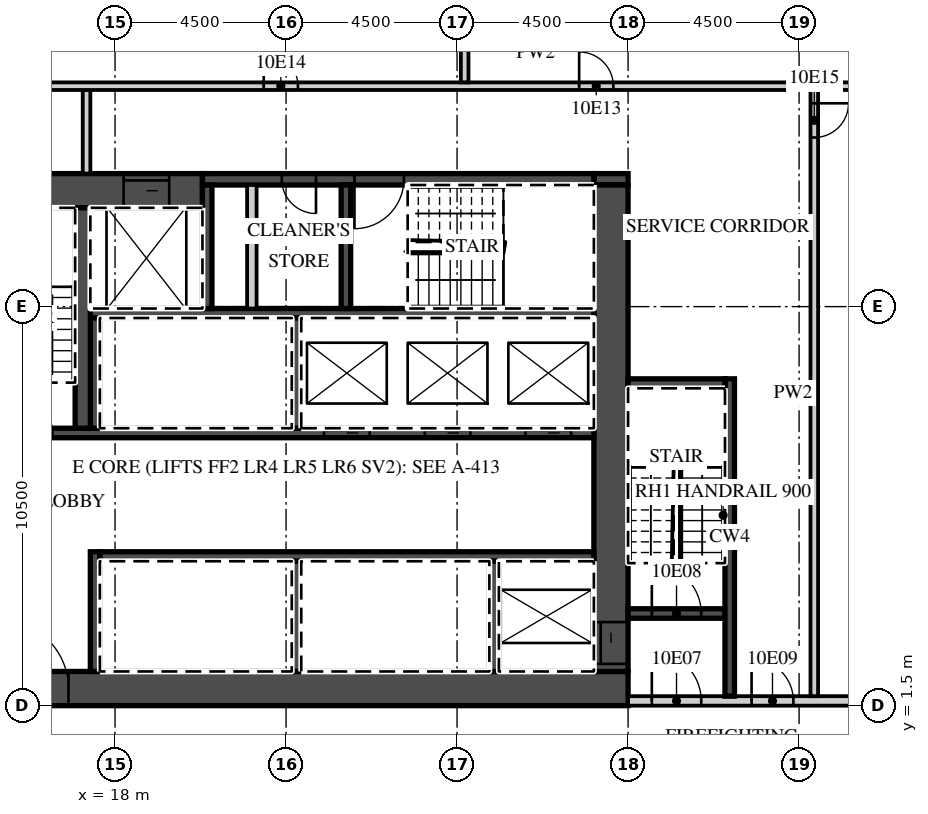
"""IFC4 building model, lengths in metres.
Left out: names, types, materials, properties, quantities, classifications, styles, units other than length and angle.
Written with IfcOpenShell. Run it as: python <this file> out.ifc"""

import sys

from ifc_helpers import new_model, si_unit, direction, frame, frame_2d, origin, place, context, subcontext, project, spatial, rectangle, extrude, element, fill, save


model = new_model("IFC4")
c1 = context("Model", 3, precision=1e-05, world=origin(), true_north=direction((0.0, 1.0)))
c2 = subcontext(c1, "Body", "Model", "MODEL_VIEW")
j1 = project(units=[si_unit("LENGTHUNIT", "METRE"), si_unit("PLANEANGLEUNIT", "RADIAN")], contexts=[c1])
p1 = place(None, origin())
s1 = spatial("IfcSite", under=j1, at=p1, CompositionType="ELEMENT")
p2 = place(p1, origin())
s2 = spatial("IfcBuilding", under=s1, at=p2, CompositionType="ELEMENT")
p3 = place(p2, frame((0.0, 0.0, 63.3)))
s3 = spatial("IfcBuildingStorey", under=s2, at=p3, CompositionType="ELEMENT", Elevation=63.3)
p4 = place(p3, frame((13.5, 1.95, 0.0), z_axis=(0.0, 0.0, 1.0), x_axis=(1.0, 0.0, 0.0)))
e1 = element("IfcWall", 1, at=p4, inside=s3, PredefinedType="SHEAR", context=c2, shape_type="SweptSolid", body=[
    extrude(rectangle(XDim=18.0, YDim=0.9, at=frame_2d((9.0, 0.0))), origin(), (0.0, 0.0, 1.0), 3.02),
])
p5 = place(p4, frame((1.475, 0.0, 0.0)))
e2 = element("IfcOpeningElement", 2, at=p5, cuts=e1, PredefinedType="OPENING", context=c2, shape_type="SweptSolid", body=[
    extrude(rectangle(XDim=1.8, YDim=2.1, at=frame_2d((0.9, 1.05))), frame((0.0, 0.46, 0.0), z_axis=(0.0, -1.0, 0.0), x_axis=(1.0, 0.0, 0.0)), (0.0, 0.0, 1.0), 0.92),
])
p6 = place(p3, frame((13.5, 15.05, 0.0), z_axis=(0.0, 0.0, 1.0), x_axis=(1.0, 0.0, 0.0)))
e3 = element("IfcWall", 3, at=p6, inside=s3, PredefinedType="SHEAR", context=c2, shape_type="SweptSolid", body=[
    extrude(rectangle(XDim=6.8, YDim=0.9, at=frame_2d((3.4, 0.0))), origin(), (0.0, 0.0, 1.0), 3.02),
])
p7 = place(p6, frame((4.725, 0.0, 0.0)))
e4 = element("IfcOpeningElement", 4, at=p7, cuts=e3, PredefinedType="OPENING", context=c2, shape_type="SweptSolid", body=[
    extrude(rectangle(XDim=1.2, YDim=2.1, at=frame_2d((0.6, 1.05))), frame((0.0, 0.46, 0.0), z_axis=(0.0, -1.0, 0.0), x_axis=(1.0, 0.0, 0.0)), (0.0, 0.0, 1.0), 0.92),
])
p8 = place(p3, frame((30.6, 15.35, 0.0), z_axis=(0.0, 0.0, 1.0), x_axis=(1.0, 0.0, 0.0)))
e5 = element("IfcWall", 5, at=p8, inside=s3, PredefinedType="SHEAR", context=c2, shape_type="SweptSolid", body=[
    extrude(rectangle(XDim=0.9, YDim=0.3, at=frame_2d((0.45, 0.0))), origin(), (0.0, 0.0, 1.0), 3.02),
])
p9 = place(p3, frame((20.3, 15.35, 0.0), z_axis=(0.0, 0.0, 1.0), x_axis=(1.0, 0.0, 0.0)))
e6 = element("IfcWall", 6, at=p9, inside=s3, PredefinedType="SHEAR", context=c2, shape_type="SweptSolid", body=[
    extrude(rectangle(XDim=10.3, YDim=0.3, at=frame_2d((5.15, 0.0))), origin(), (0.0, 0.0, 1.0), 3.02),
])
p10 = place(p9, frame((4.0, 0.0, 0.0)))
e7 = element("IfcOpeningElement", 7, at=p10, cuts=e6, PredefinedType="OPENING", context=c2, shape_type="SweptSolid", body=[
    extrude(rectangle(XDim=1.3, YDim=2.1, at=frame_2d((0.65, 1.05))), frame((0.0, 0.16, 0.0), z_axis=(0.0, -1.0, 0.0), x_axis=(1.0, 0.0, 0.0)), (0.0, 0.0, 1.0), 0.32),
])
p11 = place(p9, frame((2.087, 0.0, 0.0)))
e8 = element("IfcOpeningElement", 8, at=p11, cuts=e6, PredefinedType="OPENING", context=c2, shape_type="SweptSolid", body=[
    extrude(rectangle(XDim=0.9, YDim=2.1, at=frame_2d((0.45, 1.05))), frame((0.0, 0.16, 0.0), z_axis=(0.0, -1.0, 0.0), x_axis=(1.0, 0.0, 0.0)), (0.0, 0.0, 1.0), 0.32),
])
p12 = place(p3, frame((31.05, 2.4, 0.0), z_axis=(0.0, 0.0, 1.0), x_axis=(0.0, 1.0, 0.0)))
e9 = element("IfcWall", 9, at=p12, inside=s3, PredefinedType="SHEAR", context=c2, shape_type="SweptSolid", body=[
    extrude(rectangle(XDim=12.8, YDim=0.9, at=frame_2d((6.4, 0.0))), origin(), (0.0, 0.0, 1.0), 3.02),
])
p13 = place(p12, frame((0.2, 0.0, 0.0)))
e10 = element("IfcOpeningElement", 10, at=p13, cuts=e9, PredefinedType="OPENING", context=c2, shape_type="SweptSolid", body=[
    extrude(rectangle(XDim=1.1, YDim=2.1, at=frame_2d((0.55, 1.05))), frame((0.0, 0.46, 0.0), z_axis=(0.0, -1.0, 0.0), x_axis=(1.0, 0.0, 0.0)), (0.0, 0.0, 1.0), 0.92),
])
p14 = place(p3, frame((17.6, 5.425, 0.0), z_axis=(0.0, 0.0, 1.0), x_axis=(1.0, 0.0, 0.0)))
e11 = element("IfcWall", 11, at=p14, inside=s3, PredefinedType="SHEAR", context=c2, shape_type="SweptSolid", body=[
    extrude(rectangle(XDim=13.0, YDim=0.25, at=frame_2d((6.5, 0.0))), origin(), (0.0, 0.0, 1.0), 3.02),
])
p15 = place(p3, frame((17.475, 2.4, 0.0), z_axis=(0.0, 0.0, 1.0), x_axis=(0.0, 1.0, 0.0)))
e12 = element("IfcWall", 12, at=p15, inside=s3, PredefinedType="SHEAR", context=c2, shape_type="SweptSolid", body=[
    extrude(rectangle(XDim=3.15, YDim=0.25, at=frame_2d((1.575, 0.0))), origin(), (0.0, 0.0, 1.0), 3.02),
])
for number, where, z_axis, x_axis in (
    (13, (27.975, 2.4, 0.0), (0.0, 0.0, 1.0), (0.0, 1.0, 0.0)),
    (14, (22.775, 2.4, 0.0), (0.0, 0.0, 1.0), (0.0, 1.0, 0.0)),
):
    element("IfcWall", number, at=place(p3, frame(where, z_axis=z_axis, x_axis=x_axis)), inside=s3, PredefinedType="SHEAR", context=c2, shape_type="SweptSolid", body=[
        extrude(rectangle(XDim=2.9, YDim=0.25, at=frame_2d((1.45, 0.0))), origin(), (0.0, 0.0, 1.0), 3.02),
    ])
p16 = place(p3, frame((14.4, 8.675, 0.0), z_axis=(0.0, 0.0, 1.0), x_axis=(1.0, 0.0, 0.0)))
e15 = element("IfcWall", 15, at=p16, inside=s3, PredefinedType="SHEAR", context=c2, shape_type="SweptSolid", body=[
    extrude(rectangle(XDim=16.2, YDim=0.25, at=frame_2d((8.1, 0.0))), origin(), (0.0, 0.0, 1.0), 3.02),
])
p17 = place(p16, frame((14.4, 0.0, 0.0)))
e16 = element("IfcOpeningElement", 16, at=p17, cuts=e15, PredefinedType="OPENING", context=c2, shape_type="SweptSolid", body=[
    extrude(rectangle(XDim=1.2, YDim=2.1, at=frame_2d((0.6, 1.05))), frame((0.0, 0.135, 0.0), z_axis=(0.0, -1.0, 0.0), x_axis=(1.0, 0.0, 0.0)), (0.0, 0.0, 1.0), 0.27),
])
p18 = place(p16, frame((11.75, 0.0, 0.0)))
e17 = element("IfcOpeningElement", 17, at=p18, cuts=e15, PredefinedType="OPENING", context=c2, shape_type="SweptSolid", body=[
    extrude(rectangle(XDim=1.2, YDim=2.1, at=frame_2d((0.6, 1.05))), frame((0.0, 0.135, 0.0), z_axis=(0.0, -1.0, 0.0), x_axis=(1.0, 0.0, 0.0)), (0.0, 0.0, 1.0), 0.27),
])
p19 = place(p16, frame((9.1, 0.0, 0.0)))
e18 = element("IfcOpeningElement", 18, at=p19, cuts=e15, PredefinedType="OPENING", context=c2, shape_type="SweptSolid", body=[
    extrude(rectangle(XDim=1.2, YDim=2.1, at=frame_2d((0.6, 1.05))), frame((0.0, 0.135, 0.0), z_axis=(0.0, -1.0, 0.0), x_axis=(1.0, 0.0, 0.0)), (0.0, 0.0, 1.0), 0.27),
])
p20 = place(p16, frame((0.65, 0.0, 0.0)))
e19 = element("IfcOpeningElement", 19, at=p20, cuts=e15, PredefinedType="OPENING", context=c2, shape_type="SweptSolid", body=[
    extrude(rectangle(XDim=1.3, YDim=2.1, at=frame_2d((0.65, 1.05))), frame((0.0, 0.135, 0.0), z_axis=(0.0, -1.0, 0.0), x_axis=(1.0, 0.0, 0.0)), (0.0, 0.0, 1.0), 0.27),
])
p21 = place(p3, frame((17.35, 11.825, 0.0), z_axis=(0.0, 0.0, 1.0), x_axis=(1.0, 0.0, 0.0)))
e20 = element("IfcWall", 20, at=p21, inside=s3, PredefinedType="SHEAR", context=c2, shape_type="SweptSolid", body=[
    extrude(rectangle(XDim=13.25, YDim=0.25, at=frame_2d((6.625, 0.0))), origin(), (0.0, 0.0, 1.0), 3.02),
])
for number, where, z_axis, x_axis in (
    (21, (17.475, 8.8, 0.0), (0.0, 0.0, 1.0), (0.0, 1.0, 0.0)),
    (22, (22.775, 8.8, 0.0), (0.0, 0.0, 1.0), (0.0, 1.0, 0.0)),
):
    element("IfcWall", number, at=place(p3, frame(where, z_axis=z_axis, x_axis=x_axis)), inside=s3, PredefinedType="SHEAR", context=c2, shape_type="SweptSolid", body=[
        extrude(rectangle(XDim=2.9, YDim=0.25, at=frame_2d((1.45, 0.0))), origin(), (0.0, 0.0, 1.0), 3.02),
    ])
p22 = place(p3, frame((17.15, 8.8, 0.0), z_axis=(0.0, 0.0, 1.0), x_axis=(0.0, 1.0, 0.0)))
e23 = element("IfcWall", 23, at=p22, inside=s3, PredefinedType="SHEAR", context=c2, shape_type="SweptSolid", body=[
    extrude(rectangle(XDim=5.8, YDim=0.4, at=frame_2d((2.9, 0.0))), origin(), (0.0, 0.0, 1.0), 3.02),
])
for number, where, z_axis, x_axis in (
    (24, (20.425, 11.95, 0.0), (0.0, 0.0, 1.0), (0.0, 1.0, 0.0)),
    (25, (24.075, 11.95, 0.0), (0.0, 0.0, 1.0), (0.0, 1.0, 0.0)),
):
    element("IfcWall", number, at=place(p3, frame(where, z_axis=z_axis, x_axis=x_axis)), inside=s3, PredefinedType="SHEAR", context=c2, shape_type="SweptSolid", body=[
        extrude(rectangle(XDim=3.25, YDim=0.25, at=frame_2d((1.625, 0.0))), origin(), (0.0, 0.0, 1.0), 3.02),
    ])
p23 = place(p3, frame((21.6, 11.95, 0.0), z_axis=(0.0, 0.0, 1.0), x_axis=(0.0, 1.0, 0.0)))
e26 = element("IfcWall", 26, at=p23, inside=s3, PredefinedType="PARTITIONING", context=c2, shape_type="SweptSolid", body=[
    extrude(rectangle(XDim=3.25, YDim=0.25, at=frame_2d((1.625, 0.0))), origin(), (0.0, 0.0, 1.0), 3.02),
])
p24 = place(p3, frame((31.5, 1.625, 0.0), z_axis=(0.0, 0.0, 1.0), x_axis=(1.0, 0.0, 0.0)))
e27 = element("IfcWall", 27, at=p24, inside=s3, PredefinedType="PARTITIONING", context=c2, shape_type="SweptSolid", body=[
    extrude(rectangle(XDim=13.05, YDim=0.25, at=frame_2d((6.525, 0.0))), origin(), (0.0, 0.0, 1.0), 3.02),
])
p25 = place(p24, frame((0.625, 0.0, 0.0)))
e28 = element("IfcOpeningElement", 28, at=p25, cuts=e27, PredefinedType="OPENING", context=c2, shape_type="SweptSolid", body=[
    extrude(rectangle(XDim=1.3, YDim=2.1, at=frame_2d((0.65, 1.05))), frame((0.0, 0.135, 0.0), z_axis=(0.0, -1.0, 0.0), x_axis=(1.0, 0.0, 0.0)), (0.0, 0.0, 1.0), 0.27),
])
p26 = place(p24, frame((3.25, 0.0, 0.0)))
e29 = element("IfcOpeningElement", 29, at=p26, cuts=e27, PredefinedType="OPENING", context=c2, shape_type="SweptSolid", body=[
    extrude(rectangle(XDim=1.1, YDim=2.1, at=frame_2d((0.55, 1.05))), frame((0.0, 0.135, 0.0), z_axis=(0.0, -1.0, 0.0), x_axis=(1.0, 0.0, 0.0)), (0.0, 0.0, 1.0), 0.27),
])
p27 = place(p3, frame((31.5, 3.925, 0.0), z_axis=(0.0, 0.0, 1.0), x_axis=(1.0, 0.0, 0.0)))
e30 = element("IfcWall", 30, at=p27, inside=s3, PredefinedType="SHEAR", context=c2, shape_type="SweptSolid", body=[
    extrude(rectangle(XDim=2.55, YDim=0.25, at=frame_2d((1.275, 0.0))), origin(), (0.0, 0.0, 1.0), 3.02),
])
p28 = place(p27, frame((0.625, 0.0, 0.0)))
e31 = element("IfcOpeningElement", 31, at=p28, cuts=e30, PredefinedType="OPENING", context=c2, shape_type="SweptSolid", body=[
    extrude(rectangle(XDim=1.3, YDim=2.1, at=frame_2d((0.65, 1.05))), frame((0.0, 0.135, 0.0), z_axis=(0.0, -1.0, 0.0), x_axis=(1.0, 0.0, 0.0)), (0.0, 0.0, 1.0), 0.27),
])
p29 = place(p3, frame((34.175, 1.75, 0.0), z_axis=(0.0, 0.0, 1.0), x_axis=(0.0, 1.0, 0.0)))
e32 = element("IfcWall", 32, at=p29, inside=s3, PredefinedType="SHEAR", context=c2, shape_type="SweptSolid", body=[
    extrude(rectangle(XDim=8.35, YDim=0.25, at=frame_2d((4.175, 0.0))), origin(), (0.0, 0.0, 1.0), 3.02),
])
p30 = place(p3, frame((31.5, 9.975, 0.0), z_axis=(0.0, 0.0, 1.0), x_axis=(1.0, 0.0, 0.0)))
e33 = element("IfcWall", 33, at=p30, inside=s3, PredefinedType="SHEAR", context=c2, shape_type="SweptSolid", body=[
    extrude(rectangle(XDim=2.55, YDim=0.25, at=frame_2d((1.275, 0.0))), origin(), (0.0, 0.0, 1.0), 3.02),
])
p31 = place(p3, frame((17.25, 15.5, 0.0), z_axis=(0.0, 0.0, 1.0), x_axis=(0.0, 1.0, 0.0)))
e34 = element("IfcWall", 34, at=p31, inside=s3, PredefinedType="PARTITIONING", context=c2, shape_type="SweptSolid", body=[
    extrude(rectangle(XDim=2.2, YDim=0.2, at=frame_2d((1.1, 0.0))), origin(), (0.0, 0.0, 1.0), 3.02),
])
p32 = place(p3, frame((36.4, 1.75, 0.0), z_axis=(0.0, 0.0, 1.0), x_axis=(0.0, 1.0, 0.0)))
e35 = element("IfcWall", 35, at=p32, inside=s3, PredefinedType="PARTITIONING", context=c2, shape_type="SweptSolid", body=[
    extrude(rectangle(XDim=15.95, YDim=0.2, at=frame_2d((7.975, 0.0))), origin(), (0.0, 0.0, 1.0), 3.02),
])
p33 = place(p32, frame((14.7, 0.0, 0.0)))
e36 = element("IfcOpeningElement", 36, at=p33, cuts=e35, PredefinedType="OPENING", context=c2, shape_type="SweptSolid", body=[
    extrude(rectangle(XDim=0.9, YDim=2.1, at=frame_2d((0.45, 1.05))), frame((0.0, 0.11, 0.0), z_axis=(0.0, -1.0, 0.0), x_axis=(1.0, 0.0, 0.0)), (0.0, 0.0, 1.0), 0.22),
])
p34 = place(p3, frame((13.6, 17.8, 0.0), z_axis=(0.0, 0.0, 1.0), x_axis=(1.0, 0.0, 0.0)))
e37 = element("IfcWall", 37, at=p34, inside=s3, PredefinedType="PARTITIONING", context=c2, shape_type="SweptSolid", body=[
    extrude(rectangle(XDim=30.95, YDim=0.2, at=frame_2d((15.475, 0.0))), origin(), (0.0, 0.0, 1.0), 3.02),
])
p35 = place(p34, frame((16.613, 0.0, 0.0)))
e38 = element("IfcOpeningElement", 38, at=p35, cuts=e37, PredefinedType="OPENING", context=c2, shape_type="SweptSolid", body=[
    extrude(rectangle(XDim=0.9, YDim=2.1, at=frame_2d((0.45, 1.05))), frame((0.0, 0.11, 0.0), z_axis=(0.0, -1.0, 0.0), x_axis=(1.0, 0.0, 0.0)), (0.0, 0.0, 1.0), 0.22),
])
p36 = place(p34, frame((8.312, 0.0, 0.0)))
e39 = element("IfcOpeningElement", 39, at=p36, cuts=e37, PredefinedType="OPENING", context=c2, shape_type="SweptSolid", body=[
    extrude(rectangle(XDim=0.9, YDim=2.1, at=frame_2d((0.45, 1.05))), frame((0.0, 0.11, 0.0), z_axis=(0.0, -1.0, 0.0), x_axis=(1.0, 0.0, 0.0)), (0.0, 0.0, 1.0), 0.22),
])
p37 = place(p3, frame((27.2, 17.9, 0.0), z_axis=(0.0, 0.0, 1.0), x_axis=(0.0, 1.0, 0.0)))
e40 = element("IfcWall", 40, at=p37, inside=s3, PredefinedType="PARTITIONING", context=c2, shape_type="SweptSolid", body=[
    extrude(rectangle(XDim=3.65, YDim=0.2, at=frame_2d((1.825, 0.0))), origin(), (0.0, 0.0, 1.0), 3.02),
])
p38 = place(p17, origin())
e41 = element("IfcDoor", 41, at=p38, inside=s3, OperationType="SLIDING_TO_LEFT", PredefinedType="DOOR", context=c2, shape_type="SweptSolid", body=[
    extrude(rectangle(XDim=1.2, YDim=2.1, at=frame_2d((0.6, 1.05))), frame((0.0, 0.025, 0.0), z_axis=(0.0, -1.0, 0.0), x_axis=(1.0, 0.0, 0.0)), (0.0, 0.0, 1.0), 0.05),
])
fill(e16, e41)
p39 = place(p18, origin())
e42 = element("IfcDoor", 42, at=p39, inside=s3, OperationType="SLIDING_TO_RIGHT", PredefinedType="DOOR", context=c2, shape_type="SweptSolid", body=[
    extrude(rectangle(XDim=1.2, YDim=2.1, at=frame_2d((0.6, 1.05))), frame((0.0, 0.025, 0.0), z_axis=(0.0, -1.0, 0.0), x_axis=(1.0, 0.0, 0.0)), (0.0, 0.0, 1.0), 0.05),
])
fill(e17, e42)
p40 = place(p19, origin())
e43 = element("IfcDoor", 43, at=p40, inside=s3, OperationType="SLIDING_TO_RIGHT", PredefinedType="DOOR", context=c2, shape_type="SweptSolid", body=[
    extrude(rectangle(XDim=1.2, YDim=2.1, at=frame_2d((0.6, 1.05))), frame((0.0, 0.025, 0.0), z_axis=(0.0, -1.0, 0.0), x_axis=(1.0, 0.0, 0.0)), (0.0, 0.0, 1.0), 0.05),
])
fill(e18, e43)
p41 = place(p7, origin())
e44 = element("IfcDoor", 44, at=p41, inside=s3, OperationType="SLIDING_TO_LEFT", PredefinedType="DOOR", context=c2, shape_type="SweptSolid", body=[
    extrude(rectangle(XDim=1.2, YDim=2.1, at=frame_2d((0.6, 1.05))), frame((0.0, 0.025, 0.0), z_axis=(0.0, -1.0, 0.0), x_axis=(1.0, 0.0, 0.0)), (0.0, 0.0, 1.0), 0.05),
])
fill(e4, e44)
p42 = place(p13, origin())
e45 = element("IfcDoor", 45, at=p42, inside=s3, OperationType="SLIDING_TO_LEFT", PredefinedType="DOOR", context=c2, shape_type="SweptSolid", body=[
    extrude(rectangle(XDim=1.1, YDim=2.1, at=frame_2d((0.55, 1.05))), frame((0.0, 0.025, 0.0), z_axis=(0.0, -1.0, 0.0), x_axis=(1.0, 0.0, 0.0)), (0.0, 0.0, 1.0), 0.05),
])
fill(e10, e45)
p43 = place(p5, origin())
e46 = element("IfcDoor", 46, at=p43, inside=s3, OperationType="DOUBLE_DOOR_DOUBLE_SWING", PredefinedType="DOOR", context=c2, shape_type="SweptSolid", body=[
    extrude(rectangle(XDim=1.8, YDim=2.1, at=frame_2d((0.9, 1.05))), frame((0.0, 0.025, 0.0), z_axis=(0.0, -1.0, 0.0), x_axis=(1.0, 0.0, 0.0)), (0.0, 0.0, 1.0), 0.05),
])
fill(e2, e46)
p44 = place(p25, origin())
e47 = element("IfcDoor", 47, at=p44, inside=s3, OperationType="SINGLE_SWING_LEFT", PredefinedType="DOOR", context=c2, shape_type="SweptSolid", body=[
    extrude(rectangle(XDim=1.3, YDim=2.1, at=frame_2d((0.65, 1.05))), frame((0.0, 0.025, 0.0), z_axis=(0.0, -1.0, 0.0), x_axis=(1.0, 0.0, 0.0)), (0.0, 0.0, 1.0), 0.05),
])
fill(e28, e47)
p45 = place(p28, origin())
e48 = element("IfcDoor", 48, at=p45, inside=s3, OperationType="SINGLE_SWING_LEFT", PredefinedType="DOOR", context=c2, shape_type="SweptSolid", body=[
    extrude(rectangle(XDim=1.3, YDim=2.1, at=frame_2d((0.65, 1.05))), frame((0.0, 0.025, 0.0), z_axis=(0.0, -1.0, 0.0), x_axis=(1.0, 0.0, 0.0)), (0.0, 0.0, 1.0), 0.05),
])
fill(e31, e48)
p46 = place(p26, origin())
e49 = element("IfcDoor", 49, at=p46, inside=s3, OperationType="SINGLE_SWING_LEFT", PredefinedType="DOOR", context=c2, shape_type="SweptSolid", body=[
    extrude(rectangle(XDim=1.1, YDim=2.1, at=frame_2d((0.55, 1.05))), frame((0.0, 0.025, 0.0), z_axis=(0.0, -1.0, 0.0), x_axis=(1.0, 0.0, 0.0)), (0.0, 0.0, 1.0), 0.05),
])
fill(e29, e49)
p47 = place(p10, origin())
e50 = element("IfcDoor", 50, at=p47, inside=s3, OperationType="SINGLE_SWING_LEFT", PredefinedType="DOOR", context=c2, shape_type="SweptSolid", body=[
    extrude(rectangle(XDim=1.3, YDim=2.1, at=frame_2d((0.65, 1.05))), frame((0.0, 0.025, 0.0), z_axis=(0.0, -1.0, 0.0), x_axis=(1.0, 0.0, 0.0)), (0.0, 0.0, 1.0), 0.05),
])
fill(e7, e50)
p48 = place(p11, origin())
e51 = element("IfcDoor", 51, at=p48, inside=s3, OperationType="SINGLE_SWING_RIGHT", PredefinedType="DOOR", context=c2, shape_type="SweptSolid", body=[
    extrude(rectangle(XDim=0.9, YDim=2.1, at=frame_2d((0.45, 1.05))), frame((0.0, 0.025, 0.0), z_axis=(0.0, -1.0, 0.0), x_axis=(1.0, 0.0, 0.0)), (0.0, 0.0, 1.0), 0.05),
])
fill(e8, e51)
p49 = place(p35, origin())
e52 = element("IfcDoor", 52, at=p49, inside=s3, OperationType="SINGLE_SWING_LEFT", PredefinedType="DOOR", context=c2, shape_type="SweptSolid", body=[
    extrude(rectangle(XDim=0.9, YDim=2.1, at=frame_2d((0.45, 1.05))), frame((0.0, 0.025, 0.0), z_axis=(0.0, -1.0, 0.0), x_axis=(1.0, 0.0, 0.0)), (0.0, 0.0, 1.0), 0.05),
])
fill(e38, e52)
p50 = place(p36, origin())
e53 = element("IfcDoor", 53, at=p50, inside=s3, OperationType="SINGLE_SWING_LEFT", PredefinedType="DOOR", context=c2, shape_type="SweptSolid", body=[
    extrude(rectangle(XDim=0.9, YDim=2.1, at=frame_2d((0.45, 1.05))), frame((0.0, 0.025, 0.0), z_axis=(0.0, -1.0, 0.0), x_axis=(1.0, 0.0, 0.0)), (0.0, 0.0, 1.0), 0.05),
])
fill(e39, e53)
p51 = place(p33, origin())
e54 = element("IfcDoor", 54, at=p51, inside=s3, OperationType="SINGLE_SWING_RIGHT", PredefinedType="DOOR", context=c2, shape_type="SweptSolid", body=[
    extrude(rectangle(XDim=0.9, YDim=2.1, at=frame_2d((0.45, 1.05))), frame((0.0, 0.025, 0.0), z_axis=(0.0, -1.0, 0.0), x_axis=(1.0, 0.0, 0.0)), (0.0, 0.0, 1.0), 0.05),
])
fill(e36, e54)
save(model, sys.argv[1])
